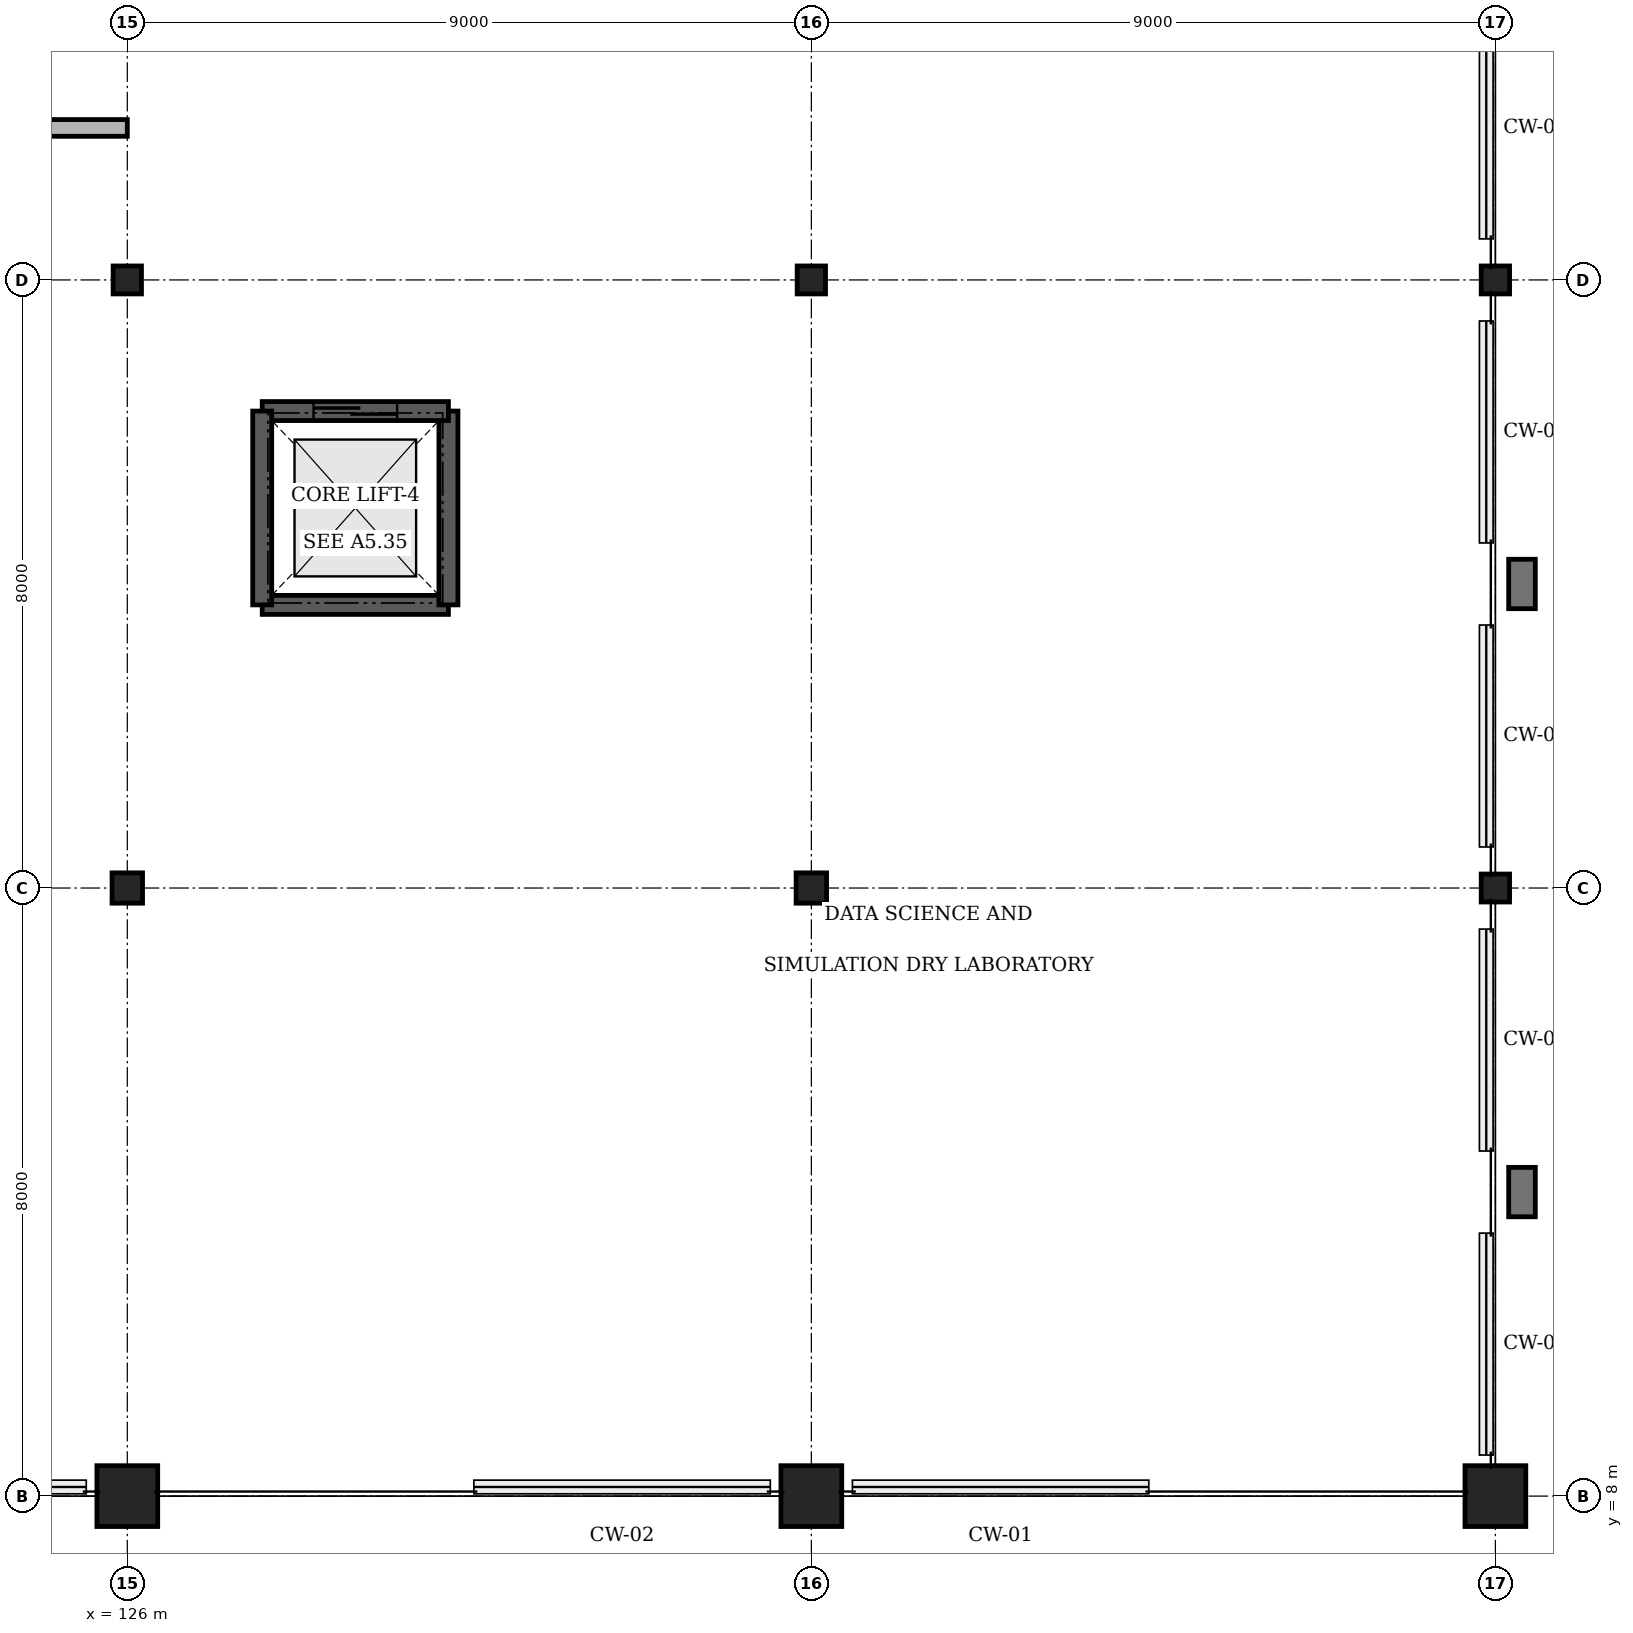
"""IFC4 building model, lengths in metres.
Left out: names, types, materials, properties, quantities, classifications, styles, units other than length and angle.
Written with IfcOpenShell. Run it as: python <this file> out.ifc"""

import sys

from ifc_helpers import new_model, si_unit, direction, frame, frame_2d, origin, origin_2d, place, context, subcontext, project, spatial, rectangle, circle, i_section, extrude, element, fill, save


model = new_model("IFC4")
c1 = context("Model", 3, precision=1e-05, world=origin(), true_north=direction((0.0, 1.0)))
c2 = subcontext(c1, "Body", "Model", "MODEL_VIEW")
j1 = project(units=[si_unit("LENGTHUNIT", "METRE"), si_unit("PLANEANGLEUNIT", "RADIAN")], contexts=[c1])
p1 = place(None, origin())
s1 = spatial("IfcSite", under=j1, at=p1, CompositionType="ELEMENT")
p2 = place(p1, origin())
s2 = spatial("IfcBuilding", under=s1, at=p2, CompositionType="ELEMENT")
p3 = place(p2, frame((0.0, 0.0, 10.8)))
s3 = spatial("IfcBuildingStorey", under=s2, at=p3, CompositionType="ELEMENT", Elevation=10.8)
p4 = place(p3, frame((126.0, 8.0, 0.0), z_axis=(0.0, 0.0, 1.0), x_axis=(1.0, 0.0, 0.0)))
e1 = element("IfcColumn", 1, at=p4, inside=s3, PredefinedType="COLUMN", context=c2, shape_type="SweptSolid", body=[
    extrude(circle(Radius=0.4, at=origin_2d()), origin(), (0.0, 0.0, 1.0), 4.8),
])
p5 = place(p3, frame((126.0, 16.0, 0.0), z_axis=(0.0, 0.0, 1.0), x_axis=(1.0, 0.0, 0.0)))
e2 = element("IfcColumn", 2, at=p5, inside=s3, PredefinedType="COLUMN", context=c2, shape_type="SweptSolid", body=[
    extrude(i_section(OverallWidth=0.401, OverallDepth=0.399, WebThickness=0.025, FlangeThickness=0.04, FilletRadius=0.015, at=origin_2d()), origin(), (0.0, 0.0, 1.0), 4.8),
])
p6 = place(p3, frame((126.0, 24.0, 0.0), z_axis=(0.0, 0.0, 1.0), x_axis=(1.0, 0.0, 0.0)))
e3 = element("IfcColumn", 3, at=p6, inside=s3, PredefinedType="COLUMN", context=c2, shape_type="SweptSolid", body=[
    extrude(i_section(OverallWidth=0.373, OverallDepth=0.368, WebThickness=0.015, FlangeThickness=0.024, FilletRadius=0.015, at=origin_2d()), origin(), (0.0, 0.0, 1.0), 4.8),
])
p7 = place(p3, frame((135.0, 8.0, 0.0), z_axis=(0.0, 0.0, 1.0), x_axis=(1.0, 0.0, 0.0)))
e4 = element("IfcColumn", 4, at=p7, inside=s3, PredefinedType="COLUMN", context=c2, shape_type="SweptSolid", body=[
    extrude(circle(Radius=0.4, at=origin_2d()), origin(), (0.0, 0.0, 1.0), 4.8),
])
p8 = place(p3, frame((135.0, 16.0, 0.0), z_axis=(0.0, 0.0, 1.0), x_axis=(1.0, 0.0, 0.0)))
e5 = element("IfcColumn", 5, at=p8, inside=s3, PredefinedType="COLUMN", context=c2, shape_type="SweptSolid", body=[
    extrude(i_section(OverallWidth=0.401, OverallDepth=0.399, WebThickness=0.025, FlangeThickness=0.04, FilletRadius=0.015, at=origin_2d()), origin(), (0.0, 0.0, 1.0), 4.8),
])
p9 = place(p3, frame((135.0, 24.0, 0.0), z_axis=(0.0, 0.0, 1.0), x_axis=(1.0, 0.0, 0.0)))
e6 = element("IfcColumn", 6, at=p9, inside=s3, PredefinedType="COLUMN", context=c2, shape_type="SweptSolid", body=[
    extrude(i_section(OverallWidth=0.373, OverallDepth=0.368, WebThickness=0.015, FlangeThickness=0.024, FilletRadius=0.015, at=origin_2d()), origin(), (0.0, 0.0, 1.0), 4.8),
])
p10 = place(p3, frame((144.0, 8.0, 0.0), z_axis=(0.0, 0.0, 1.0), x_axis=(1.0, 0.0, 0.0)))
e7 = element("IfcColumn", 7, at=p10, inside=s3, PredefinedType="COLUMN", context=c2, shape_type="SweptSolid", body=[
    extrude(circle(Radius=0.4, at=origin_2d()), origin(), (0.0, 0.0, 1.0), 4.8),
])
for number, where, z_axis, x_axis in (
    (8, (144.0, 16.0, 0.0), (0.0, 0.0, 1.0), (1.0, 0.0, 0.0)),
    (9, (144.0, 24.0, 0.0), (0.0, 0.0, 1.0), (1.0, 0.0, 0.0)),
):
    element("IfcColumn", number, at=place(p3, frame(where, z_axis=z_axis, x_axis=x_axis)), inside=s3, PredefinedType="COLUMN", context=c2, shape_type="SweptSolid", body=[
        extrude(i_section(OverallWidth=0.373, OverallDepth=0.368, WebThickness=0.015, FlangeThickness=0.024, FilletRadius=0.015, at=origin_2d()), origin(), (0.0, 0.0, 1.0), 4.8),
    ])
for number, where, z_axis, x_axis in (
    (10, (144.35, 12.0, 0.0), (0.0, 0.0, 1.0), (0.0, 1.0, 0.0)),
    (11, (144.35, 20.0, 0.0), (0.0, 0.0, 1.0), (0.0, 1.0, 0.0)),
):
    element("IfcColumn", number, at=place(p3, frame(where, z_axis=z_axis, x_axis=x_axis)), inside=s3, PredefinedType="PILASTER", context=c2, shape_type="SweptSolid", body=[
        extrude(rectangle(XDim=0.65, YDim=0.35, at=origin_2d()), origin(), (0.0, 0.0, 1.0), 4.8),
    ])
p11 = place(p3, frame((127.775, 19.725, 0.0), z_axis=(0.0, 0.0, 1.0), x_axis=(1.0, 0.0, 0.0)))
e12 = element("IfcWall", 12, at=p11, inside=s3, PredefinedType="SOLIDWALL", context=c2, shape_type="SweptSolid", body=[
    extrude(rectangle(XDim=2.45, YDim=0.25, at=frame_2d((1.225, 0.0))), origin(), (0.0, 0.0, 1.0), 4.8),
])
p12 = place(p3, frame((130.225, 19.725, 0.0), z_axis=(0.0, 0.0, 1.0), x_axis=(0.0, 1.0, 0.0)))
e13 = element("IfcWall", 13, at=p12, inside=s3, PredefinedType="SOLIDWALL", context=c2, shape_type="SweptSolid", body=[
    extrude(rectangle(XDim=2.55, YDim=0.25, at=frame_2d((1.275, 0.0))), origin(), (0.0, 0.0, 1.0), 4.8),
])
p13 = place(p3, frame((130.225, 22.275, 0.0), z_axis=(0.0, 0.0, 1.0), x_axis=(-1.0, 0.0, 0.0)))
e14 = element("IfcWall", 14, at=p13, inside=s3, PredefinedType="SOLIDWALL", context=c2, shape_type="SweptSolid", body=[
    extrude(rectangle(XDim=2.45, YDim=0.25, at=frame_2d((1.225, 0.0))), origin(), (0.0, 0.0, 1.0), 4.8),
])
p14 = place(p13, frame((0.675, 0.0, 0.0)))
e15 = element("IfcOpeningElement", 15, at=p14, cuts=e14, PredefinedType="OPENING", context=c2, shape_type="SweptSolid", body=[
    extrude(rectangle(XDim=1.1, YDim=2.2, at=frame_2d((0.55, 1.1))), frame((0.0, 0.135, 0.0), z_axis=(0.0, -1.0, 0.0), x_axis=(1.0, 0.0, 0.0)), (0.0, 0.0, 1.0), 0.27),
])
p15 = place(p3, frame((127.775, 22.275, 0.0), z_axis=(0.0, 0.0, 1.0), x_axis=(0.0, -1.0, 0.0)))
e16 = element("IfcWall", 16, at=p15, inside=s3, PredefinedType="SOLIDWALL", context=c2, shape_type="SweptSolid", body=[
    extrude(rectangle(XDim=2.55, YDim=0.25, at=frame_2d((1.275, 0.0))), origin(), (0.0, 0.0, 1.0), 4.8),
])
p16 = place(p3, frame((110.225, 26.0, 0.0), z_axis=(0.0, 0.0, 1.0), x_axis=(1.0, 0.0, 0.0)))
e17 = element("IfcWall", 17, at=p16, inside=s3, PredefinedType="SOLIDWALL", context=c2, shape_type="SweptSolid", body=[
    extrude(rectangle(XDim=15.775, YDim=0.22, at=frame_2d((7.887, 0.0))), origin(), (0.0, 0.0, 1.0), 3.15),
])
p17 = place(p14, origin())
e18 = element("IfcDoor", 18, at=p17, inside=s3, OperationType="SLIDING_TO_LEFT", PredefinedType="DOOR", context=c2, shape_type="SweptSolid", body=[
    extrude(rectangle(XDim=1.1, YDim=2.2, at=frame_2d((0.55, 1.1))), frame((0.0, 0.025, 0.0), z_axis=(0.0, -1.0, 0.0), x_axis=(1.0, 0.0, 0.0)), (0.0, 0.0, 1.0), 0.05),
])
fill(e15, e18)
save(model, sys.argv[1])
